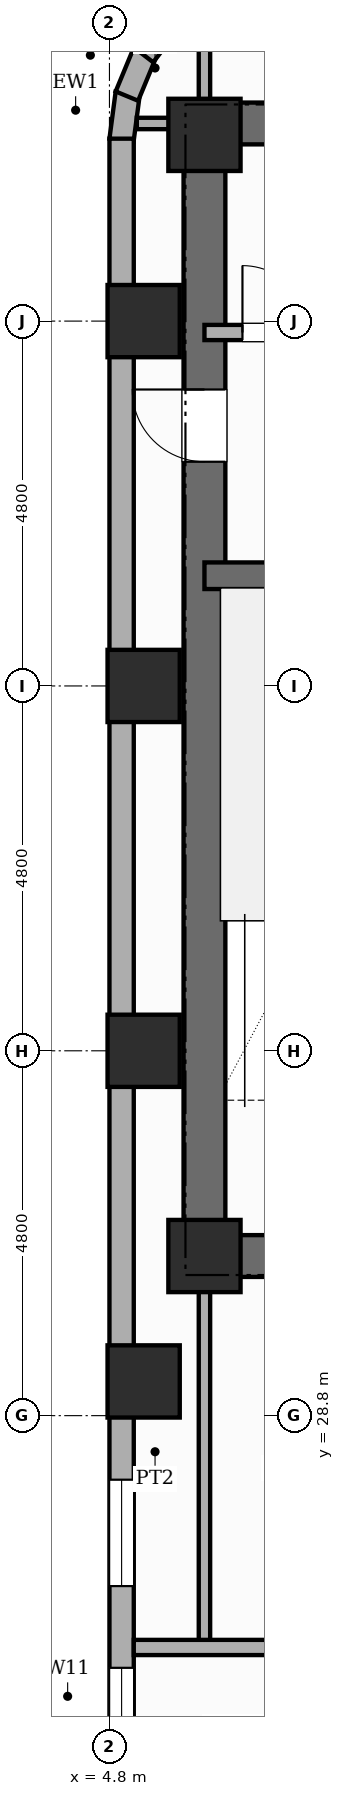
"""IFC4 building model, lengths in metres.
Left out: names, types, materials, properties, quantities, classifications, styles, units other than length and angle.
Written with IfcOpenShell. Run it as: python <this file> out.ifc"""

import sys

from ifc_helpers import new_model, si_unit, direction, frame, frame_2d, origin, origin_2d, place, context, subcontext, project, spatial, rectangle, extrude, element, fill, save


model = new_model("IFC4")
c1 = context("Model", 3, precision=1e-05, world=origin(), true_north=direction((0.0, 1.0)))
c2 = subcontext(c1, "Body", "Model", "MODEL_VIEW")
j1 = project(units=[si_unit("LENGTHUNIT", "METRE"), si_unit("PLANEANGLEUNIT", "RADIAN")], contexts=[c1])
p1 = place(None, origin())
s1 = spatial("IfcSite", under=j1, at=p1, CompositionType="ELEMENT")
p2 = place(p1, origin())
s2 = spatial("IfcBuilding", under=s1, at=p2, CompositionType="ELEMENT")
p3 = place(p2, frame((0.0, 0.0, 107.2)))
s3 = spatial("IfcBuildingStorey", under=s2, at=p3, CompositionType="ELEMENT", Elevation=107.2)
p4 = place(p3, frame((6.05, 30.625, 0.0), z_axis=(0.0, 0.0, 1.0), x_axis=(0.0, 1.0, 0.0)))
e1 = element("IfcWall", 1, at=p4, inside=s3, PredefinedType="SHEAR", context=c2, shape_type="SweptSolid", body=[
    extrude(rectangle(XDim=15.45, YDim=0.55, at=frame_2d((7.725, 0.0))), origin(), (0.0, 0.0, 1.0), 3.6),
])
p5 = place(p4, frame((10.725, 0.0, 0.0)))
e2 = element("IfcOpeningElement", 2, at=p5, cuts=e1, PredefinedType="OPENING", context=c2, shape_type="SweptSolid", body=[
    extrude(rectangle(XDim=0.95, YDim=2.15, at=frame_2d((0.475, 1.075))), frame((0.0, 0.285, 0.0), z_axis=(0.0, -1.0, 0.0), x_axis=(1.0, 0.0, 0.0)), (0.0, 0.0, 1.0), 0.57),
])
p6 = place(p3, frame((6.05, 45.8, 0.0), z_axis=(0.0, 0.0, 1.0), x_axis=(1.0, 0.0, 0.0)))
e3 = element("IfcWall", 3, at=p6, inside=s3, PredefinedType="SHEAR", context=c2, shape_type="SweptSolid", body=[
    extrude(rectangle(XDim=16.7, YDim=0.55, at=frame_2d((8.35, 0.0))), origin(), (0.0, 0.0, 1.0), 3.6),
])
p7 = place(p3, frame((6.05, 30.9, 0.0), z_axis=(0.0, 0.0, 1.0), x_axis=(1.0, 0.0, 0.0)))
e4 = element("IfcWall", 4, at=p7, inside=s3, PredefinedType="SHEAR", context=c2, shape_type="SweptSolid", body=[
    extrude(rectangle(XDim=3.91, YDim=0.55, at=frame_2d((1.955, 0.0))), origin(), (0.0, 0.0, 1.0), 3.6),
])
p8 = place(p3, frame((6.05, 39.85, 0.0), z_axis=(0.0, 0.0, 1.0), x_axis=(1.0, 0.0, 0.0)))
e5 = element("IfcWall", 5, at=p8, inside=s3, PredefinedType="SHEAR", context=c2, shape_type="SweptSolid", body=[
    extrude(rectangle(XDim=3.91, YDim=0.35, at=frame_2d((1.955, 0.0))), origin(), (0.0, 0.0, 1.0), 3.6),
])
for number, where, z_axis, x_axis in (
    (6, (5.25, 29.25, 0.0), (0.0, 0.0, 1.0), (1.0, 0.0, 0.0)),
    (7, (5.25, 33.6, 0.0), (0.0, 0.0, 1.0), (1.0, 0.0, 0.0)),
    (8, (5.25, 38.4, 0.0), (0.0, 0.0, 1.0), (1.0, 0.0, 0.0)),
    (9, (5.25, 43.2, 0.0), (0.0, 0.0, 1.0), (1.0, 0.0, 0.0)),
    (10, (6.05, 30.9, 0.0), (0.0, 0.0, 1.0), (1.0, 0.0, 0.0)),
    (11, (6.05, 45.65, 0.0), (0.0, 0.0, 1.0), (1.0, 0.0, 0.0)),
):
    element("IfcColumn", number, at=place(p3, frame(where, z_axis=z_axis, x_axis=x_axis)), inside=s3, PredefinedType="COLUMN", context=c2, shape_type="SweptSolid", body=[
        extrude(rectangle(XDim=0.95, YDim=0.95, at=origin_2d()), origin(), (0.0, 0.0, 1.0), 3.6),
    ])
for number, where, z_axis, x_axis in (
    (12, (4.958, 45.579, 0.0), (0.0, 0.0, 1.0), (0.131, 0.991, 0.0)),
    (13, (5.03, 46.16, 0.0), (0.0, 0.0, 1.0), (0.383, 0.924, 0.0)),
):
    element("IfcWall", number, at=place(p3, frame(where, z_axis=z_axis, x_axis=x_axis)), inside=s3, PredefinedType="STANDARD", context=c2, shape_type="SweptSolid", body=[
        extrude(rectangle(XDim=0.626, YDim=0.32, at=frame_2d((0.313, 0.0))), origin(), (0.0, 0.0, 1.0), 3.36),
    ])
p9 = place(p3, frame((5.248, 46.703, 0.0), z_axis=(0.0, 0.0, 1.0), x_axis=(0.608938521285, 0.7932174212, 0.0)))
e14 = element("IfcWall", 14, at=p9, inside=s3, PredefinedType="STANDARD", context=c2, shape_type="SweptSolid", body=[
    extrude(rectangle(XDim=0.627, YDim=0.32, at=frame_2d((0.313, 0.0))), origin(), (0.0, 0.0, 1.0), 3.36),
])
p10 = place(p3, frame((4.96, 12.0, 0.0), z_axis=(0.0, 0.0, 1.0), x_axis=(0.0, 1.0, 0.0)))
e15 = element("IfcWall", 15, at=p10, inside=s3, PredefinedType="STANDARD", context=c2, shape_type="SweptSolid", body=[
    extrude(rectangle(XDim=33.6, YDim=0.32, at=frame_2d((16.8, 0.0))), origin(), (0.0, 0.0, 1.0), 2.54),
])
p11 = place(p10, frame((3.153, 0.0, 0.45)))
e16 = element("IfcOpeningElement", 16, at=p11, cuts=e15, PredefinedType="OPENING", context=c2, shape_type="SweptSolid", body=[
    extrude(rectangle(XDim=0.6, YDim=1.8, at=frame_2d((0.3, 0.9))), frame((0.0, 0.17, 0.0), z_axis=(0.0, -1.0, 0.0), x_axis=(1.0, 0.0, 0.0)), (0.0, 0.0, 1.0), 0.34),
])
p12 = place(p10, frame((5.853, 0.0, 0.45)))
e17 = element("IfcOpeningElement", 17, at=p12, cuts=e15, PredefinedType="OPENING", context=c2, shape_type="SweptSolid", body=[
    extrude(rectangle(XDim=0.6, YDim=1.8, at=frame_2d((0.3, 0.9))), frame((0.0, 0.17, 0.0), z_axis=(0.0, -1.0, 0.0), x_axis=(1.0, 0.0, 0.0)), (0.0, 0.0, 1.0), 0.34),
])
p13 = place(p10, frame((9.853, 0.0, 0.65)))
e18 = element("IfcOpeningElement", 18, at=p13, cuts=e15, PredefinedType="OPENING", context=c2, shape_type="SweptSolid", body=[
    extrude(rectangle(XDim=1.4, YDim=1.1, at=frame_2d((0.7, 0.55))), frame((0.0, 0.17, 0.0), z_axis=(0.0, -1.0, 0.0), x_axis=(1.0, 0.0, 0.0)), (0.0, 0.0, 1.0), 0.34),
])
p14 = place(p10, frame((0.355, 0.0, 0.45)))
e19 = element("IfcOpeningElement", 19, at=p14, cuts=e15, PredefinedType="OPENING", context=c2, shape_type="SweptSolid", body=[
    extrude(rectangle(XDim=0.95, YDim=1.8, at=frame_2d((0.475, 0.9))), frame((0.0, 0.17, 0.0), z_axis=(0.0, -1.0, 0.0), x_axis=(1.0, 0.0, 0.0)), (0.0, 0.0, 1.0), 0.34),
])
p15 = place(p10, frame((4.33, 0.0, 0.45)))
e20 = element("IfcOpeningElement", 20, at=p15, cuts=e15, PredefinedType="OPENING", context=c2, shape_type="SweptSolid", body=[
    extrude(rectangle(XDim=0.95, YDim=1.8, at=frame_2d((0.475, 0.9))), frame((0.0, 0.17, 0.0), z_axis=(0.0, -1.0, 0.0), x_axis=(1.0, 0.0, 0.0)), (0.0, 0.0, 1.0), 0.34),
])
p16 = place(p10, frame((8.33, 0.0, 0.45)))
e21 = element("IfcOpeningElement", 21, at=p16, cuts=e15, PredefinedType="OPENING", context=c2, shape_type="SweptSolid", body=[
    extrude(rectangle(XDim=0.95, YDim=1.8, at=frame_2d((0.475, 0.9))), frame((0.0, 0.17, 0.0), z_axis=(0.0, -1.0, 0.0), x_axis=(1.0, 0.0, 0.0)), (0.0, 0.0, 1.0), 0.34),
])
p17 = place(p10, frame((12.732, 0.0, 0.45)))
e22 = element("IfcOpeningElement", 22, at=p17, cuts=e15, PredefinedType="OPENING", context=c2, shape_type="SweptSolid", body=[
    extrude(rectangle(XDim=0.75, YDim=1.8, at=frame_2d((0.375, 0.9))), frame((0.0, 0.17, 0.0), z_axis=(0.0, -1.0, 0.0), x_axis=(1.0, 0.0, 0.0)), (0.0, 0.0, 1.0), 0.34),
])
p18 = place(p10, frame((14.558, 0.0, 0.65)))
e23 = element("IfcOpeningElement", 23, at=p18, cuts=e15, PredefinedType="OPENING", context=c2, shape_type="SweptSolid", body=[
    extrude(rectangle(XDim=1.4, YDim=1.1, at=frame_2d((0.7, 0.55))), frame((0.0, 0.17, 0.0), z_axis=(0.0, -1.0, 0.0), x_axis=(1.0, 0.0, 0.0)), (0.0, 0.0, 1.0), 0.34),
])
p19 = place(p3, frame((6.05, 43.05, 0.0), z_axis=(0.0, 0.0, 1.0), x_axis=(1.0, 0.0, 0.0)))
e24 = element("IfcWall", 24, at=p19, inside=s3, PredefinedType="POLYGONAL", context=c2, shape_type="SweptSolid", body=[
    extrude(rectangle(XDim=3.91, YDim=0.2, at=frame_2d((1.955, 0.0))), origin(), (0.0, 0.0, 1.0), 2.54),
])
p20 = place(p19, frame((0.5, 0.0, 0.0)))
e25 = element("IfcOpeningElement", 25, at=p20, cuts=e24, PredefinedType="OPENING", context=c2, shape_type="SweptSolid", body=[
    extrude(rectangle(XDim=0.88, YDim=2.1, at=frame_2d((0.44, 1.05))), frame((0.0, 0.11, 0.0), z_axis=(0.0, -1.0, 0.0), x_axis=(1.0, 0.0, 0.0)), (0.0, 0.0, 1.0), 0.22),
])
p21 = place(p19, frame((2.35, 0.0, 0.0)))
e26 = element("IfcOpeningElement", 26, at=p21, cuts=e24, PredefinedType="OPENING", context=c2, shape_type="SweptSolid", body=[
    extrude(rectangle(XDim=0.88, YDim=2.1, at=frame_2d((0.44, 1.05))), frame((0.0, 0.11, 0.0), z_axis=(0.0, -1.0, 0.0), x_axis=(1.0, 0.0, 0.0)), (0.0, 0.0, 1.0), 0.22),
])
p22 = place(p3, frame((6.05, 25.75, 0.0), z_axis=(0.0, 0.0, 1.0), x_axis=(0.0, 1.0, 0.0)))
e27 = element("IfcWall", 27, at=p22, inside=s3, PredefinedType="PARTITIONING", context=c2, shape_type="SweptSolid", body=[
    extrude(rectangle(XDim=5.15, YDim=0.15, at=frame_2d((2.575, 0.0))), origin(), (0.0, 0.0, 1.0), 3.36),
])
p23 = place(p3, frame((5.12, 25.75, 0.0), z_axis=(0.0, 0.0, 1.0), x_axis=(1.0, 0.0, 0.0)))
e28 = element("IfcWall", 28, at=p23, inside=s3, PredefinedType="PARTITIONING", context=c2, shape_type="SweptSolid", body=[
    extrude(rectangle(XDim=11.13, YDim=0.2, at=frame_2d((5.565, 0.0))), origin(), (0.0, 0.0, 1.0), 3.36),
])
p24 = place(p3, frame((5.16, 45.8, 0.0), z_axis=(0.0, 0.0, 1.0), x_axis=(1.0, 0.0, 0.0)))
e29 = element("IfcWall", 29, at=p24, inside=s3, PredefinedType="PARTITIONING", context=c2, shape_type="SweptSolid", body=[
    extrude(rectangle(XDim=0.89, YDim=0.15, at=frame_2d((0.445, 0.0))), origin(), (0.0, 0.0, 1.0), 3.36),
])
p25 = place(p3, frame((6.05, 45.8, 0.0), z_axis=(0.0, 0.0, 1.0), x_axis=(0.0, 1.0, 0.0)))
e30 = element("IfcWall", 30, at=p25, inside=s3, PredefinedType="PARTITIONING", context=c2, shape_type="SweptSolid", body=[
    extrude(rectangle(XDim=1.46, YDim=0.15, at=frame_2d((0.73, 0.0))), origin(), (0.0, 0.0, 1.0), 3.36),
])
p26 = place(p17, origin())
e31 = element("IfcWindow", 31, at=p26, inside=s3, PartitioningType="SINGLE_PANEL", PredefinedType="WINDOW", context=c2, shape_type="SweptSolid", body=[
    extrude(rectangle(XDim=0.75, YDim=1.8, at=frame_2d((0.375, 0.9))), frame((0.0, 0.03, 0.0), z_axis=(0.0, -1.0, 0.0), x_axis=(1.0, 0.0, 0.0)), (0.0, 0.0, 1.0), 0.06),
])
fill(e22, e31)
p27 = place(p18, origin())
e32 = element("IfcWindow", 32, at=p27, inside=s3, PartitioningType="SINGLE_PANEL", PredefinedType="WINDOW", context=c2, shape_type="SweptSolid", body=[
    extrude(rectangle(XDim=1.4, YDim=1.1, at=frame_2d((0.7, 0.55))), frame((0.0, 0.03, 0.0), z_axis=(0.0, -1.0, 0.0), x_axis=(1.0, 0.0, 0.0)), (0.0, 0.0, 1.0), 0.06),
])
fill(e23, e32)
p28 = place(p5, origin())
e33 = element("IfcDoor", 33, at=p28, inside=s3, OperationType="SINGLE_SWING_RIGHT", PredefinedType="DOOR", context=c2, shape_type="SweptSolid", body=[
    extrude(rectangle(XDim=0.95, YDim=2.15, at=frame_2d((0.475, 1.075))), frame((0.0, 0.025, 0.0), z_axis=(0.0, -1.0, 0.0), x_axis=(1.0, 0.0, 0.0)), (0.0, 0.0, 1.0), 0.05),
])
fill(e2, e33)
p29 = place(p20, origin())
e34 = element("IfcDoor", 34, at=p29, inside=s3, OperationType="SINGLE_SWING_LEFT", PredefinedType="DOOR", context=c2, shape_type="SweptSolid", body=[
    extrude(rectangle(XDim=0.88, YDim=2.1, at=frame_2d((0.44, 1.05))), frame((0.0, 0.025, 0.0), z_axis=(0.0, -1.0, 0.0), x_axis=(1.0, 0.0, 0.0)), (0.0, 0.0, 1.0), 0.05),
])
fill(e25, e34)
save(model, sys.argv[1])
